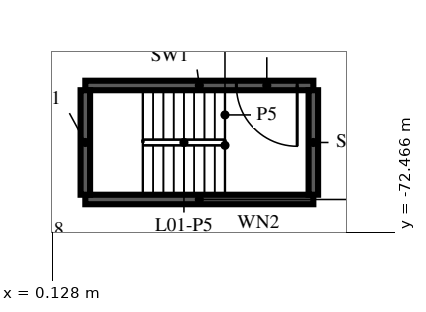
"""IFC4 building model, lengths in metres.
Left out: names, types, materials, properties, quantities, classifications, styles, units other than length and angle.
Written with IfcOpenShell. Run it as: python <this file> out.ifc"""

import sys

from ifc_helpers import new_model, si_unit, direction, frame, frame_2d, origin, place, context, subcontext, project, spatial, rectangle, extrude, element, fill, save


model = new_model("IFC4")
c1 = context("Model", 3, precision=1e-05, world=origin(), true_north=direction((0.0, 1.0)))
c2 = subcontext(c1, "Body", "Model", "MODEL_VIEW")
j1 = project(units=[si_unit("LENGTHUNIT", "METRE"), si_unit("PLANEANGLEUNIT", "RADIAN")], contexts=[c1])
p1 = place(None, origin())
s1 = spatial("IfcSite", under=j1, at=p1, CompositionType="ELEMENT")
p2 = place(p1, origin())
s2 = spatial("IfcBuilding", under=s1, at=p2, CompositionType="ELEMENT")
p3 = place(p2, frame((0.0, 0.0, 6.0)))
s3 = spatial("IfcBuildingStorey", under=s2, at=p3, CompositionType="ELEMENT", Elevation=6.0)
p4 = place(p3, frame((1.0, -71.6, 0.0), z_axis=(0.0, 0.0, 1.0), x_axis=(1.0, 0.0, 0.0)))
e1 = element("IfcWall", 1, at=p4, inside=s3, PredefinedType="SOLIDWALL", context=c2, shape_type="SweptSolid", body=[
    extrude(rectangle(XDim=6.0, YDim=0.25, at=frame_2d((3.0, 0.0))), origin(), (0.0, 0.0, 1.0), 6.0),
])
p5 = place(p3, frame((7.0, -68.6, 0.0), z_axis=(0.0, 0.0, 1.0), x_axis=(-1.0, 0.0, 0.0)))
e2 = element("IfcWall", 2, at=p5, inside=s3, PredefinedType="SOLIDWALL", context=c2, shape_type="SweptSolid", body=[
    extrude(rectangle(XDim=6.0, YDim=0.25, at=frame_2d((3.0, 0.0))), origin(), (0.0, 0.0, 1.0), 6.0),
])
p6 = place(p5, frame((0.425, 0.0, 0.0)))
e3 = element("IfcOpeningElement", 3, at=p6, cuts=e2, PredefinedType="OPENING", context=c2, shape_type="SweptSolid", body=[
    extrude(rectangle(XDim=1.6, YDim=2.1, at=frame_2d((0.8, 1.05))), frame((0.0, 0.14, 0.0), z_axis=(0.0, -1.0, 0.0), x_axis=(1.0, 0.0, 0.0)), (0.0, 0.0, 1.0), 0.28),
])
for number, where, z_axis, x_axis in (
    (4, (7.0, -71.475, 0.0), (0.0, 0.0, 1.0), (0.0, 1.0, 0.0)),
    (5, (1.0, -68.725, 0.0), (0.0, 0.0, 1.0), (0.0, -1.0, 0.0)),
):
    element("IfcWall", number, at=place(p3, frame(where, z_axis=z_axis, x_axis=x_axis)), inside=s3, PredefinedType="SOLIDWALL", context=c2, shape_type="SweptSolid", body=[
        extrude(rectangle(XDim=2.75, YDim=0.25, at=frame_2d((1.375, 0.0))), origin(), (0.0, 0.0, 1.0), 6.0),
    ])
p7 = place(p6, origin())
e6 = element("IfcDoor", 6, at=p7, inside=s3, OperationType="DOUBLE_DOOR_SINGLE_SWING", PredefinedType="DOOR", context=c2, shape_type="SweptSolid", body=[
    extrude(rectangle(XDim=1.6, YDim=2.1, at=frame_2d((0.8, 1.05))), frame((0.0, 0.125, 0.0), z_axis=(0.0, -1.0, 0.0), x_axis=(1.0, 0.0, 0.0)), (0.0, 0.0, 1.0), 0.25),
])
fill(e3, e6)
save(model, sys.argv[1])
